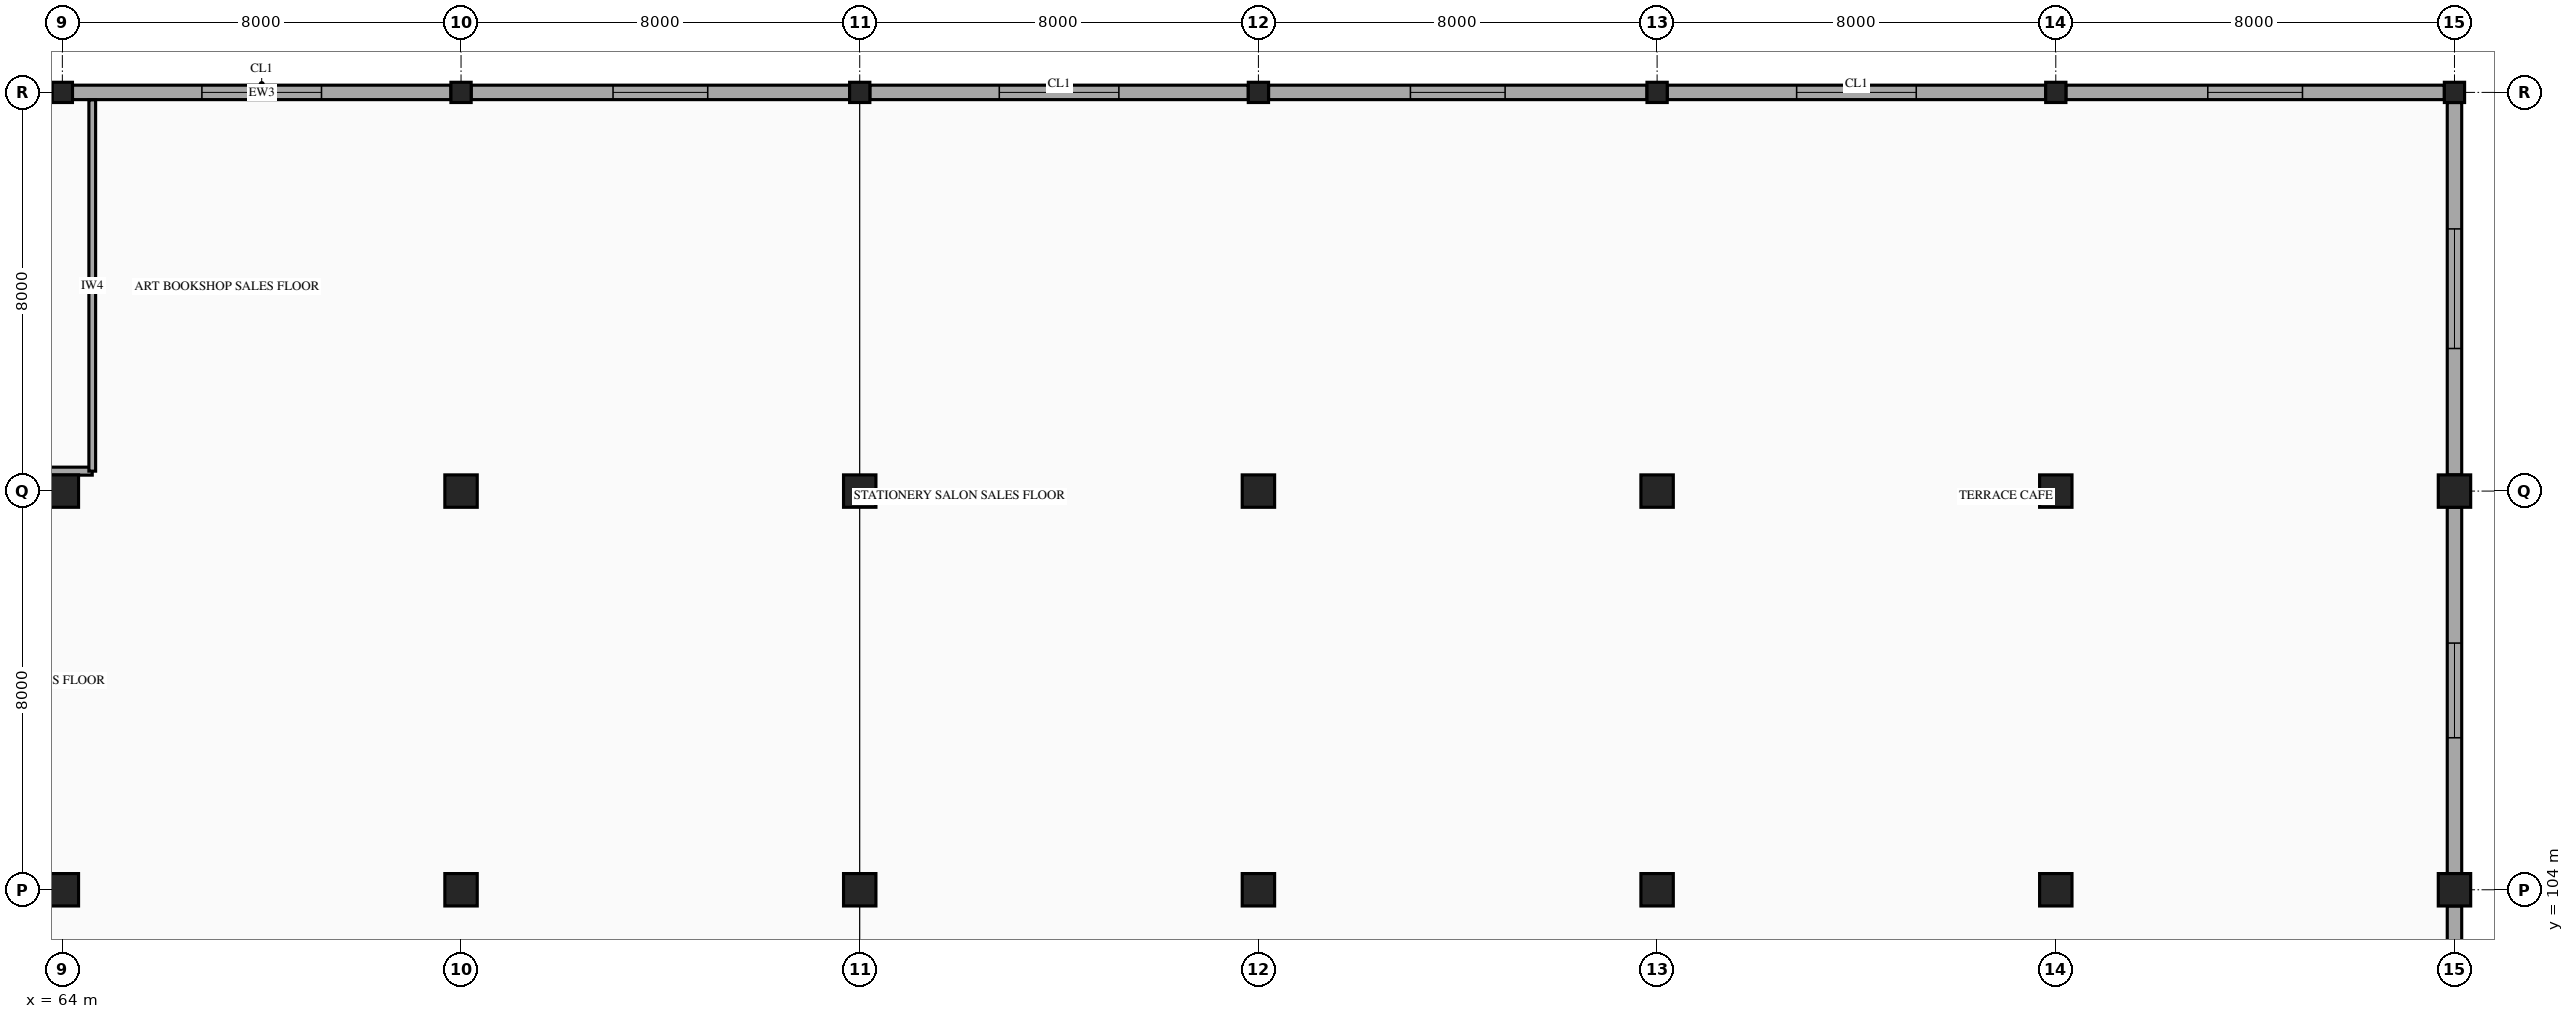
"""IFC4 building model, lengths in metres.
Left out: names, types, materials, properties, quantities, classifications, styles, units other than length and angle.
Written with IfcOpenShell. Run it as: python <this file> out.ifc"""

import sys

from ifc_helpers import new_model, si_unit, direction, frame, frame_2d, origin, origin_2d, place, context, subcontext, project, spatial, rectangle, hollow_rectangle, extrude, element, fill, save


model = new_model("IFC4")
c1 = context("Model", 3, precision=1e-05, world=origin(), true_north=direction((0.0, 1.0)))
c2 = subcontext(c1, "Body", "Model", "MODEL_VIEW")
j1 = project(units=[si_unit("LENGTHUNIT", "METRE"), si_unit("PLANEANGLEUNIT", "RADIAN")], contexts=[c1])
p1 = place(None, origin())
s1 = spatial("IfcSite", under=j1, at=p1, CompositionType="ELEMENT")
p2 = place(p1, origin())
s2 = spatial("IfcBuilding", under=s1, at=p2, CompositionType="ELEMENT")
p3 = place(p2, frame((0.0, 0.0, 23.9)))
s3 = spatial("IfcBuildingStorey", under=s2, at=p3, CompositionType="ELEMENT", Elevation=23.9)
for number, where, z_axis, x_axis in (
    (1, (64.0, 104.0, 0.0), (0.0, 0.0, 1.0), (1.0, 0.0, 0.0)),
    (2, (64.0, 112.0, 0.0), (0.0, 0.0, 1.0), (1.0, 0.0, 0.0)),
):
    element("IfcColumn", number, at=place(p3, frame(where, z_axis=z_axis, x_axis=x_axis)), inside=s3, PredefinedType="COLUMN", context=c2, shape_type="SweptSolid", body=[
        extrude(rectangle(XDim=0.65, YDim=0.65, at=origin_2d()), origin(), (0.0, 0.0, 1.0), 4.5),
    ])
p4 = place(p3, frame((64.0, 120.0, 0.0), z_axis=(0.0, 0.0, 1.0), x_axis=(1.0, 0.0, 0.0)))
e3 = element("IfcColumn", 3, at=p4, inside=s3, PredefinedType="COLUMN", context=c2, shape_type="SweptSolid", body=[
    extrude(hollow_rectangle(XDim=0.406, YDim=0.406, WallThickness=0.015, InnerFilletRadius=0.015, OuterFilletRadius=0.029, at=origin_2d()), origin(), (0.0, 0.0, 1.0), 4.5),
])
for number, where, z_axis, x_axis in (
    (4, (72.0, 104.0, 0.0), (0.0, 0.0, 1.0), (1.0, 0.0, 0.0)),
    (5, (72.0, 112.0, 0.0), (0.0, 0.0, 1.0), (1.0, 0.0, 0.0)),
):
    element("IfcColumn", number, at=place(p3, frame(where, z_axis=z_axis, x_axis=x_axis)), inside=s3, PredefinedType="COLUMN", context=c2, shape_type="SweptSolid", body=[
        extrude(rectangle(XDim=0.65, YDim=0.65, at=origin_2d()), origin(), (0.0, 0.0, 1.0), 4.5),
    ])
p5 = place(p3, frame((72.0, 120.0, 0.0), z_axis=(0.0, 0.0, 1.0), x_axis=(1.0, 0.0, 0.0)))
e6 = element("IfcColumn", 6, at=p5, inside=s3, PredefinedType="COLUMN", context=c2, shape_type="SweptSolid", body=[
    extrude(hollow_rectangle(XDim=0.406, YDim=0.406, WallThickness=0.015, InnerFilletRadius=0.015, OuterFilletRadius=0.029, at=origin_2d()), origin(), (0.0, 0.0, 1.0), 4.5),
])
for number, where, z_axis, x_axis in (
    (7, (80.0, 104.0, 0.0), (0.0, 0.0, 1.0), (1.0, 0.0, 0.0)),
    (8, (80.0, 112.0, 0.0), (0.0, 0.0, 1.0), (1.0, 0.0, 0.0)),
):
    element("IfcColumn", number, at=place(p3, frame(where, z_axis=z_axis, x_axis=x_axis)), inside=s3, PredefinedType="COLUMN", context=c2, shape_type="SweptSolid", body=[
        extrude(rectangle(XDim=0.65, YDim=0.65, at=origin_2d()), origin(), (0.0, 0.0, 1.0), 4.5),
    ])
p6 = place(p3, frame((80.0, 120.0, 0.0), z_axis=(0.0, 0.0, 1.0), x_axis=(1.0, 0.0, 0.0)))
e9 = element("IfcColumn", 9, at=p6, inside=s3, PredefinedType="COLUMN", context=c2, shape_type="SweptSolid", body=[
    extrude(hollow_rectangle(XDim=0.406, YDim=0.406, WallThickness=0.015, InnerFilletRadius=0.015, OuterFilletRadius=0.029, at=origin_2d()), origin(), (0.0, 0.0, 1.0), 4.5),
])
for number, where, z_axis, x_axis in (
    (10, (88.0, 104.0, 0.0), (0.0, 0.0, 1.0), (1.0, 0.0, 0.0)),
    (11, (88.0, 112.0, 0.0), (0.0, 0.0, 1.0), (1.0, 0.0, 0.0)),
):
    element("IfcColumn", number, at=place(p3, frame(where, z_axis=z_axis, x_axis=x_axis)), inside=s3, PredefinedType="COLUMN", context=c2, shape_type="SweptSolid", body=[
        extrude(rectangle(XDim=0.65, YDim=0.65, at=origin_2d()), origin(), (0.0, 0.0, 1.0), 4.5),
    ])
p7 = place(p3, frame((88.0, 120.0, 0.0), z_axis=(0.0, 0.0, 1.0), x_axis=(1.0, 0.0, 0.0)))
e12 = element("IfcColumn", 12, at=p7, inside=s3, PredefinedType="COLUMN", context=c2, shape_type="SweptSolid", body=[
    extrude(hollow_rectangle(XDim=0.406, YDim=0.406, WallThickness=0.015, InnerFilletRadius=0.015, OuterFilletRadius=0.029, at=origin_2d()), origin(), (0.0, 0.0, 1.0), 4.5),
])
for number, where, z_axis, x_axis in (
    (13, (96.0, 104.0, 0.0), (0.0, 0.0, 1.0), (1.0, 0.0, 0.0)),
    (14, (96.0, 112.0, 0.0), (0.0, 0.0, 1.0), (1.0, 0.0, 0.0)),
):
    element("IfcColumn", number, at=place(p3, frame(where, z_axis=z_axis, x_axis=x_axis)), inside=s3, PredefinedType="COLUMN", context=c2, shape_type="SweptSolid", body=[
        extrude(rectangle(XDim=0.65, YDim=0.65, at=origin_2d()), origin(), (0.0, 0.0, 1.0), 4.5),
    ])
p8 = place(p3, frame((96.0, 120.0, 0.0), z_axis=(0.0, 0.0, 1.0), x_axis=(1.0, 0.0, 0.0)))
e15 = element("IfcColumn", 15, at=p8, inside=s3, PredefinedType="COLUMN", context=c2, shape_type="SweptSolid", body=[
    extrude(hollow_rectangle(XDim=0.406, YDim=0.406, WallThickness=0.015, InnerFilletRadius=0.015, OuterFilletRadius=0.029, at=origin_2d()), origin(), (0.0, 0.0, 1.0), 4.5),
])
for number, where, z_axis, x_axis in (
    (16, (104.0, 104.0, 0.0), (0.0, 0.0, 1.0), (1.0, 0.0, 0.0)),
    (17, (104.0, 112.0, 0.0), (0.0, 0.0, 1.0), (1.0, 0.0, 0.0)),
):
    element("IfcColumn", number, at=place(p3, frame(where, z_axis=z_axis, x_axis=x_axis)), inside=s3, PredefinedType="COLUMN", context=c2, shape_type="SweptSolid", body=[
        extrude(rectangle(XDim=0.65, YDim=0.65, at=origin_2d()), origin(), (0.0, 0.0, 1.0), 4.5),
    ])
p9 = place(p3, frame((104.0, 120.0, 0.0), z_axis=(0.0, 0.0, 1.0), x_axis=(1.0, 0.0, 0.0)))
e18 = element("IfcColumn", 18, at=p9, inside=s3, PredefinedType="COLUMN", context=c2, shape_type="SweptSolid", body=[
    extrude(hollow_rectangle(XDim=0.406, YDim=0.406, WallThickness=0.015, InnerFilletRadius=0.015, OuterFilletRadius=0.029, at=origin_2d()), origin(), (0.0, 0.0, 1.0), 4.5),
])
for number, where, z_axis, x_axis in (
    (19, (112.0, 104.0, 0.0), (0.0, 0.0, 1.0), (1.0, 0.0, 0.0)),
    (20, (112.0, 112.0, 0.0), (0.0, 0.0, 1.0), (1.0, 0.0, 0.0)),
):
    element("IfcColumn", number, at=place(p3, frame(where, z_axis=z_axis, x_axis=x_axis)), inside=s3, PredefinedType="COLUMN", context=c2, shape_type="SweptSolid", body=[
        extrude(rectangle(XDim=0.65, YDim=0.65, at=origin_2d()), origin(), (0.0, 0.0, 1.0), 4.5),
    ])
p10 = place(p3, frame((112.0, 120.0, 0.0), z_axis=(0.0, 0.0, 1.0), x_axis=(1.0, 0.0, 0.0)))
e21 = element("IfcColumn", 21, at=p10, inside=s3, PredefinedType="COLUMN", context=c2, shape_type="SweptSolid", body=[
    extrude(hollow_rectangle(XDim=0.406, YDim=0.406, WallThickness=0.015, InnerFilletRadius=0.015, OuterFilletRadius=0.029, at=origin_2d()), origin(), (0.0, 0.0, 1.0), 4.5),
])
p11 = place(p3, frame((64.203, 120.0, 0.0), z_axis=(0.0, 0.0, 1.0), x_axis=(1.0, 0.0, 0.0)))
e22 = element("IfcWall", 22, at=p11, inside=s3, PredefinedType="STANDARD", context=c2, shape_type="SweptSolid", body=[
    extrude(rectangle(XDim=7.594, YDim=0.29, at=frame_2d((3.797, 0.0))), origin(), (0.0, 0.0, 1.0), 3.48),
])
p12 = place(p11, frame((2.597, 0.0, 0.8)))
e23 = element("IfcOpeningElement", 23, at=p12, cuts=e22, PredefinedType="OPENING", context=c2, shape_type="SweptSolid", body=[
    extrude(rectangle(XDim=2.4, YDim=1.8, at=frame_2d((1.2, 0.9))), frame((0.0, 0.155, 0.0), z_axis=(0.0, -1.0, 0.0), x_axis=(1.0, 0.0, 0.0)), (0.0, 0.0, 1.0), 0.31),
])
p13 = place(p3, frame((72.203, 120.0, 0.0), z_axis=(0.0, 0.0, 1.0), x_axis=(1.0, 0.0, 0.0)))
e24 = element("IfcWall", 24, at=p13, inside=s3, PredefinedType="STANDARD", context=c2, shape_type="SweptSolid", body=[
    extrude(rectangle(XDim=7.594, YDim=0.29, at=frame_2d((3.797, 0.0))), origin(), (0.0, 0.0, 1.0), 3.48),
])
p14 = place(p13, frame((2.847, 0.0, 0.8)))
e25 = element("IfcOpeningElement", 25, at=p14, cuts=e24, PredefinedType="OPENING", context=c2, shape_type="SweptSolid", body=[
    extrude(rectangle(XDim=1.9, YDim=1.85, at=frame_2d((0.95, 0.925))), frame((0.0, 0.155, 0.0), z_axis=(0.0, -1.0, 0.0), x_axis=(1.0, 0.0, 0.0)), (0.0, 0.0, 1.0), 0.31),
])
p15 = place(p3, frame((80.203, 120.0, 0.0), z_axis=(0.0, 0.0, 1.0), x_axis=(1.0, 0.0, 0.0)))
e26 = element("IfcWall", 26, at=p15, inside=s3, PredefinedType="STANDARD", context=c2, shape_type="SweptSolid", body=[
    extrude(rectangle(XDim=7.594, YDim=0.29, at=frame_2d((3.797, 0.0))), origin(), (0.0, 0.0, 1.0), 3.48),
])
p16 = place(p15, frame((2.597, 0.0, 0.8)))
e27 = element("IfcOpeningElement", 27, at=p16, cuts=e26, PredefinedType="OPENING", context=c2, shape_type="SweptSolid", body=[
    extrude(rectangle(XDim=2.4, YDim=1.8, at=frame_2d((1.2, 0.9))), frame((0.0, 0.155, 0.0), z_axis=(0.0, -1.0, 0.0), x_axis=(1.0, 0.0, 0.0)), (0.0, 0.0, 1.0), 0.31),
])
p17 = place(p3, frame((88.203, 120.0, 0.0), z_axis=(0.0, 0.0, 1.0), x_axis=(1.0, 0.0, 0.0)))
e28 = element("IfcWall", 28, at=p17, inside=s3, PredefinedType="STANDARD", context=c2, shape_type="SweptSolid", body=[
    extrude(rectangle(XDim=7.594, YDim=0.29, at=frame_2d((3.797, 0.0))), origin(), (0.0, 0.0, 1.0), 3.48),
])
p18 = place(p17, frame((2.847, 0.0, 0.8)))
e29 = element("IfcOpeningElement", 29, at=p18, cuts=e28, PredefinedType="OPENING", context=c2, shape_type="SweptSolid", body=[
    extrude(rectangle(XDim=1.9, YDim=1.85, at=frame_2d((0.95, 0.925))), frame((0.0, 0.155, 0.0), z_axis=(0.0, -1.0, 0.0), x_axis=(1.0, 0.0, 0.0)), (0.0, 0.0, 1.0), 0.31),
])
p19 = place(p3, frame((96.203, 120.0, 0.0), z_axis=(0.0, 0.0, 1.0), x_axis=(1.0, 0.0, 0.0)))
e30 = element("IfcWall", 30, at=p19, inside=s3, PredefinedType="STANDARD", context=c2, shape_type="SweptSolid", body=[
    extrude(rectangle(XDim=7.594, YDim=0.29, at=frame_2d((3.797, 0.0))), origin(), (0.0, 0.0, 1.0), 3.48),
])
p20 = place(p19, frame((2.597, 0.0, 0.8)))
e31 = element("IfcOpeningElement", 31, at=p20, cuts=e30, PredefinedType="OPENING", context=c2, shape_type="SweptSolid", body=[
    extrude(rectangle(XDim=2.4, YDim=1.8, at=frame_2d((1.2, 0.9))), frame((0.0, 0.155, 0.0), z_axis=(0.0, -1.0, 0.0), x_axis=(1.0, 0.0, 0.0)), (0.0, 0.0, 1.0), 0.31),
])
p21 = place(p3, frame((104.203, 120.0, 0.0), z_axis=(0.0, 0.0, 1.0), x_axis=(1.0, 0.0, 0.0)))
e32 = element("IfcWall", 32, at=p21, inside=s3, PredefinedType="STANDARD", context=c2, shape_type="SweptSolid", body=[
    extrude(rectangle(XDim=7.594, YDim=0.29, at=frame_2d((3.797, 0.0))), origin(), (0.0, 0.0, 1.0), 3.48),
])
p22 = place(p21, frame((2.847, 0.0, 0.8)))
e33 = element("IfcOpeningElement", 33, at=p22, cuts=e32, PredefinedType="OPENING", context=c2, shape_type="SweptSolid", body=[
    extrude(rectangle(XDim=1.9, YDim=1.85, at=frame_2d((0.95, 0.925))), frame((0.0, 0.155, 0.0), z_axis=(0.0, -1.0, 0.0), x_axis=(1.0, 0.0, 0.0)), (0.0, 0.0, 1.0), 0.31),
])
p23 = place(p3, frame((112.0, 119.797, 0.0), z_axis=(0.0, 0.0, 1.0), x_axis=(0.0, -1.0, 0.0)))
e34 = element("IfcWall", 34, at=p23, inside=s3, PredefinedType="STANDARD", context=c2, shape_type="SweptSolid", body=[
    extrude(rectangle(XDim=7.472, YDim=0.29, at=frame_2d((3.736, 0.0))), origin(), (0.0, 0.0, 1.0), 3.48),
])
p24 = place(p23, frame((2.536, 0.0, 0.8)))
e35 = element("IfcOpeningElement", 35, at=p24, cuts=e34, PredefinedType="OPENING", context=c2, shape_type="SweptSolid", body=[
    extrude(rectangle(XDim=2.4, YDim=1.8, at=frame_2d((1.2, 0.9))), frame((0.0, 0.155, 0.0), z_axis=(0.0, -1.0, 0.0), x_axis=(1.0, 0.0, 0.0)), (0.0, 0.0, 1.0), 0.31),
])
p25 = place(p3, frame((112.0, 111.675, 0.0), z_axis=(0.0, 0.0, 1.0), x_axis=(0.0, -1.0, 0.0)))
e36 = element("IfcWall", 36, at=p25, inside=s3, PredefinedType="STANDARD", context=c2, shape_type="SweptSolid", body=[
    extrude(rectangle(XDim=7.35, YDim=0.29, at=frame_2d((3.675, 0.0))), origin(), (0.0, 0.0, 1.0), 3.48),
])
p26 = place(p25, frame((2.725, 0.0, 0.8)))
e37 = element("IfcOpeningElement", 37, at=p26, cuts=e36, PredefinedType="OPENING", context=c2, shape_type="SweptSolid", body=[
    extrude(rectangle(XDim=1.9, YDim=1.85, at=frame_2d((0.95, 0.925))), frame((0.0, 0.155, 0.0), z_axis=(0.0, -1.0, 0.0), x_axis=(1.0, 0.0, 0.0)), (0.0, 0.0, 1.0), 0.31),
])
p27 = place(p3, frame((112.0, 103.675, 0.0), z_axis=(0.0, 0.0, 1.0), x_axis=(0.0, -1.0, 0.0)))
e38 = element("IfcWall", 38, at=p27, inside=s3, PredefinedType="STANDARD", context=c2, shape_type="SweptSolid", body=[
    extrude(rectangle(XDim=7.35, YDim=0.29, at=frame_2d((3.675, 0.0))), origin(), (0.0, 0.0, 1.0), 3.48),
])
p28 = place(p3, frame((60.9, 112.4, 0.0), z_axis=(0.0, 0.0, 1.0), x_axis=(1.0, 0.0, 0.0)))
e39 = element("IfcWall", 39, at=p28, inside=s3, PredefinedType="PARTITIONING", context=c2, shape_type="SweptSolid", body=[
    extrude(rectangle(XDim=3.7, YDim=0.16, at=frame_2d((1.85, 0.0))), origin(), (0.0, 0.0, 1.0), 3.48),
])
p29 = place(p28, frame((0.548, 0.0, 0.0)))
e40 = element("IfcOpeningElement", 40, at=p29, cuts=e39, PredefinedType="OPENING", context=c2, shape_type="SweptSolid", body=[
    extrude(rectangle(XDim=1.02, YDim=2.1, at=frame_2d((0.51, 1.05))), frame((0.0, 0.09, 0.0), z_axis=(0.0, -1.0, 0.0), x_axis=(1.0, 0.0, 0.0)), (0.0, 0.0, 1.0), 0.18),
])
p30 = place(p3, frame((64.6, 112.4, 0.0), z_axis=(0.0, 0.0, 1.0), x_axis=(0.0, 1.0, 0.0)))
e41 = element("IfcWall", 41, at=p30, inside=s3, PredefinedType="PARTITIONING", context=c2, shape_type="SweptSolid", body=[
    extrude(rectangle(XDim=7.45, YDim=0.135, at=frame_2d((3.725, 0.0))), origin(), (0.0, 0.0, 1.0), 3.48),
])
p31 = place(p12, origin())
e42 = element("IfcWindow", 42, at=p31, inside=s3, PartitioningType="DOUBLE_PANEL_VERTICAL", PredefinedType="WINDOW", context=c2, shape_type="SweptSolid", body=[
    extrude(rectangle(XDim=2.4, YDim=1.8, at=frame_2d((1.2, 0.9))), frame((0.0, 0.03, 0.0), z_axis=(0.0, -1.0, 0.0), x_axis=(1.0, 0.0, 0.0)), (0.0, 0.0, 1.0), 0.06),
])
fill(e23, e42)
p32 = place(p14, origin())
e43 = element("IfcWindow", 43, at=p32, inside=s3, PartitioningType="SINGLE_PANEL", PredefinedType="WINDOW", context=c2, shape_type="SweptSolid", body=[
    extrude(rectangle(XDim=1.9, YDim=1.85, at=frame_2d((0.95, 0.925))), frame((0.0, 0.03, 0.0), z_axis=(0.0, -1.0, 0.0), x_axis=(1.0, 0.0, 0.0)), (0.0, 0.0, 1.0), 0.06),
])
fill(e25, e43)
p33 = place(p16, origin())
e44 = element("IfcWindow", 44, at=p33, inside=s3, PartitioningType="DOUBLE_PANEL_VERTICAL", PredefinedType="WINDOW", context=c2, shape_type="SweptSolid", body=[
    extrude(rectangle(XDim=2.4, YDim=1.8, at=frame_2d((1.2, 0.9))), frame((0.0, 0.03, 0.0), z_axis=(0.0, -1.0, 0.0), x_axis=(1.0, 0.0, 0.0)), (0.0, 0.0, 1.0), 0.06),
])
fill(e27, e44)
p34 = place(p18, origin())
e45 = element("IfcWindow", 45, at=p34, inside=s3, PartitioningType="SINGLE_PANEL", PredefinedType="WINDOW", context=c2, shape_type="SweptSolid", body=[
    extrude(rectangle(XDim=1.9, YDim=1.85, at=frame_2d((0.95, 0.925))), frame((0.0, 0.03, 0.0), z_axis=(0.0, -1.0, 0.0), x_axis=(1.0, 0.0, 0.0)), (0.0, 0.0, 1.0), 0.06),
])
fill(e29, e45)
p35 = place(p20, origin())
e46 = element("IfcWindow", 46, at=p35, inside=s3, PartitioningType="DOUBLE_PANEL_VERTICAL", PredefinedType="WINDOW", context=c2, shape_type="SweptSolid", body=[
    extrude(rectangle(XDim=2.4, YDim=1.8, at=frame_2d((1.2, 0.9))), frame((0.0, 0.03, 0.0), z_axis=(0.0, -1.0, 0.0), x_axis=(1.0, 0.0, 0.0)), (0.0, 0.0, 1.0), 0.06),
])
fill(e31, e46)
p36 = place(p22, origin())
e47 = element("IfcWindow", 47, at=p36, inside=s3, PartitioningType="SINGLE_PANEL", PredefinedType="WINDOW", context=c2, shape_type="SweptSolid", body=[
    extrude(rectangle(XDim=1.9, YDim=1.85, at=frame_2d((0.95, 0.925))), frame((0.0, 0.03, 0.0), z_axis=(0.0, -1.0, 0.0), x_axis=(1.0, 0.0, 0.0)), (0.0, 0.0, 1.0), 0.06),
])
fill(e33, e47)
p37 = place(p24, origin())
e48 = element("IfcWindow", 48, at=p37, inside=s3, PartitioningType="DOUBLE_PANEL_VERTICAL", PredefinedType="WINDOW", context=c2, shape_type="SweptSolid", body=[
    extrude(rectangle(XDim=2.4, YDim=1.8, at=frame_2d((1.2, 0.9))), frame((0.0, 0.03, 0.0), z_axis=(0.0, -1.0, 0.0), x_axis=(1.0, 0.0, 0.0)), (0.0, 0.0, 1.0), 0.06),
])
fill(e35, e48)
p38 = place(p26, origin())
e49 = element("IfcWindow", 49, at=p38, inside=s3, PartitioningType="SINGLE_PANEL", PredefinedType="WINDOW", context=c2, shape_type="SweptSolid", body=[
    extrude(rectangle(XDim=1.9, YDim=1.85, at=frame_2d((0.95, 0.925))), frame((0.0, 0.03, 0.0), z_axis=(0.0, -1.0, 0.0), x_axis=(1.0, 0.0, 0.0)), (0.0, 0.0, 1.0), 0.06),
])
fill(e37, e49)
save(model, sys.argv[1])
